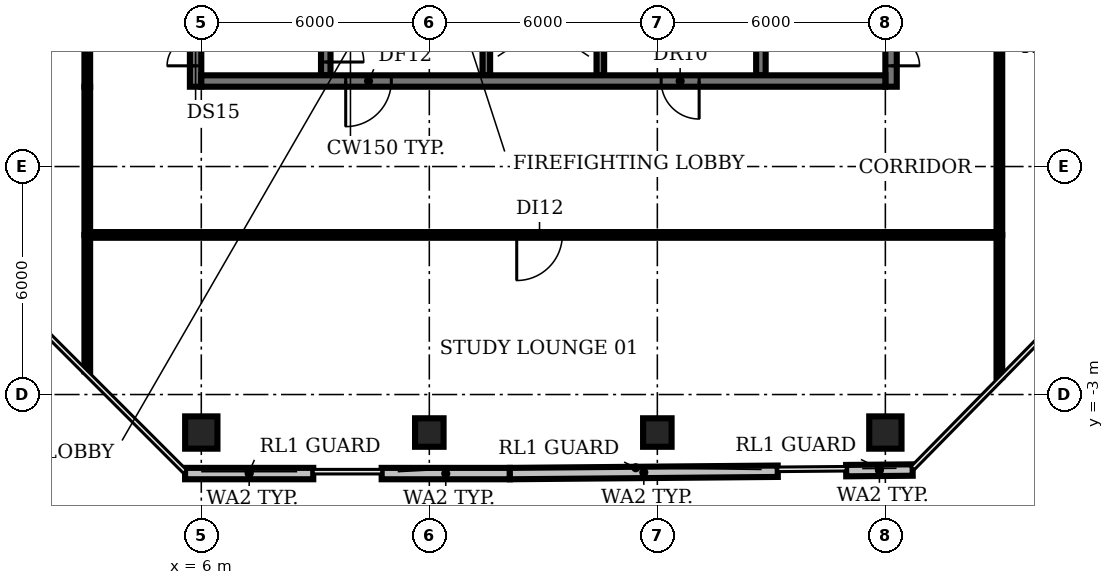
"""IFC4 building model, lengths in metres.
Left out: names, types, materials, properties, quantities, classifications, styles, units other than length and angle.
Written with IfcOpenShell. Run it as: python <this file> out.ifc"""

import sys

from ifc_helpers import new_model, si_unit, direction, frame, frame_2d, origin, origin_2d, place, context, subcontext, project, spatial, rectangle, circle, extrude, element, fill, save


model = new_model("IFC4")
c1 = context("Model", 3, precision=1e-05, world=origin(), true_north=direction((0.0, 1.0)))
c2 = subcontext(c1, "Body", "Model", "MODEL_VIEW")
j1 = project(units=[si_unit("LENGTHUNIT", "METRE"), si_unit("PLANEANGLEUNIT", "RADIAN")], contexts=[c1])
p1 = place(None, origin())
s1 = spatial("IfcSite", under=j1, at=p1, CompositionType="ELEMENT")
p2 = place(p1, origin())
s2 = spatial("IfcBuilding", under=s1, at=p2, CompositionType="ELEMENT")
p3 = place(p2, frame((0.0, 0.0, 289.4)))
s3 = spatial("IfcBuildingStorey", under=s2, at=p3, CompositionType="ELEMENT", Elevation=289.4)
p4 = place(p3, frame((6.0, -4.0, 0.0), z_axis=(0.0, 0.0, 1.0), x_axis=(1.0, 0.0, 0.0)))
e1 = element("IfcColumn", 1, at=p4, inside=s3, PredefinedType="COLUMN", context=c2, shape_type="SweptSolid", body=[
    extrude(circle(Radius=0.425, at=origin_2d()), origin(), (0.0, 0.0, 1.0), 3.85),
])
for number, where, z_axis, x_axis in (
    (2, (12.0, -4.0, 0.0), (0.0, 0.0, 1.0), (1.0, 0.0, 0.0)),
    (3, (18.0, -4.0, 0.0), (0.0, 0.0, 1.0), (1.0, 0.0, 0.0)),
):
    element("IfcColumn", number, at=place(p3, frame(where, z_axis=z_axis, x_axis=x_axis)), inside=s3, PredefinedType="COLUMN", context=c2, shape_type="SweptSolid", body=[
        extrude(rectangle(XDim=0.75, YDim=0.75, at=origin_2d()), origin(), (0.0, 0.0, 1.0), 3.85),
    ])
p5 = place(p3, frame((24.0, -4.0, 0.0), z_axis=(0.0, 0.0, 1.0), x_axis=(1.0, 0.0, 0.0)))
e4 = element("IfcColumn", 4, at=p5, inside=s3, PredefinedType="COLUMN", context=c2, shape_type="SweptSolid", body=[
    extrude(circle(Radius=0.425, at=origin_2d()), origin(), (0.0, 0.0, 1.0), 3.85),
])
p6 = place(p3, frame((5.573, -5.08, 0.0), z_axis=(0.0, 0.0, 1.0), x_axis=(1.0, 0.0, 0.0)))
e5 = element("IfcWall", 5, at=p6, inside=s3, PredefinedType="SOLIDWALL", context=c2, shape_type="SweptSolid", body=[
    extrude(rectangle(XDim=3.373, YDim=0.3, at=frame_2d((1.686, 0.0))), origin(), (0.0, 0.0, 1.0), 3.85),
])
p7 = place(p3, frame((10.746, -5.08, 0.0), z_axis=(0.0, 0.0, 1.0), x_axis=(1.0, 0.0, 0.0)))
e6 = element("IfcWall", 6, at=p7, inside=s3, PredefinedType="SOLIDWALL", context=c2, shape_type="SweptSolid", body=[
    extrude(rectangle(XDim=3.373, YDim=0.3, at=frame_2d((1.687, 0.0))), origin(), (0.0, 0.0, 1.0), 3.85),
])
p8 = place(p3, frame((14.119, -5.08, 0.0), z_axis=(0.0, 0.0, 1.0), x_axis=(0.999961916893, 0.008727242608, 0.0)))
e7 = element("IfcWall", 7, at=p8, inside=s3, PredefinedType="SOLIDWALL", context=c2, shape_type="SweptSolid", body=[
    extrude(rectangle(XDim=7.05, YDim=0.3, at=frame_2d((3.525, 0.0))), origin(), (0.0, 0.0, 1.0), 3.85),
])
p9 = place(p3, frame((22.969, -5.002, 0.0), z_axis=(0.0, 0.0, 1.0), x_axis=(0.999962584272, 0.008650436755, 0.0)))
e8 = element("IfcWall", 8, at=p9, inside=s3, PredefinedType="SOLIDWALL", context=c2, shape_type="SweptSolid", body=[
    extrude(rectangle(XDim=1.75, YDim=0.3, at=frame_2d((0.875, 0.0))), origin(), (0.0, 0.0, 1.0), 3.85),
])
p10 = place(p3, frame((9.275, 11.825, 0.0), z_axis=(0.0, 0.0, 1.0), x_axis=(0.0, -1.0, 0.0)))
e9 = element("IfcWall", 9, at=p10, inside=s3, PredefinedType="SHEAR", context=c2, shape_type="SweptSolid", body=[
    extrude(rectangle(XDim=6.425, YDim=0.25, at=frame_2d((3.212, 0.0))), origin(), (0.0, 0.0, 1.0), 3.85),
])
p11 = place(p10, frame((5.075, 0.0, 0.0)))
e10 = element("IfcOpeningElement", 10, at=p11, cuts=e9, PredefinedType="OPENING", context=c2, shape_type="SweptSolid", body=[
    extrude(rectangle(XDim=1.0, YDim=2.1, at=frame_2d((0.5, 1.05))), frame((0.0, 0.135, 0.0), z_axis=(0.0, -1.0, 0.0), x_axis=(1.0, 0.0, 0.0)), (0.0, 0.0, 1.0), 0.27),
])
p12 = place(p3, frame((13.5, 5.4, 0.0), z_axis=(0.0, 0.0, 1.0), x_axis=(0.0, 1.0, 0.0)))
e11 = element("IfcWall", 11, at=p12, inside=s3, PredefinedType="SHEAR", context=c2, shape_type="SweptSolid", body=[
    extrude(rectangle(XDim=8.2, YDim=0.2, at=frame_2d((4.1, 0.0))), origin(), (0.0, 0.0, 1.0), 3.85),
])
p13 = place(p12, frame((0.75, 0.0, 0.0)))
e12 = element("IfcOpeningElement", 12, at=p13, cuts=e11, PredefinedType="OPENING", context=c2, shape_type="SweptSolid", body=[
    extrude(rectangle(XDim=1.1, YDim=2.1, at=frame_2d((0.55, 1.05))), frame((0.0, 0.11, 0.0), z_axis=(0.0, -1.0, 0.0), x_axis=(1.0, 0.0, 0.0)), (0.0, 0.0, 1.0), 0.22),
])
p14 = place(p12, frame((3.55, 0.0, 0.0)))
e13 = element("IfcOpeningElement", 13, at=p14, cuts=e11, PredefinedType="OPENING", context=c2, shape_type="SweptSolid", body=[
    extrude(rectangle(XDim=1.1, YDim=2.1, at=frame_2d((0.55, 1.05))), frame((0.0, 0.11, 0.0), z_axis=(0.0, -1.0, 0.0), x_axis=(1.0, 0.0, 0.0)), (0.0, 0.0, 1.0), 0.22),
])
p15 = place(p12, frame((6.35, 0.0, 0.0)))
e14 = element("IfcOpeningElement", 14, at=p15, cuts=e11, PredefinedType="OPENING", context=c2, shape_type="SweptSolid", body=[
    extrude(rectangle(XDim=1.1, YDim=2.1, at=frame_2d((0.55, 1.05))), frame((0.0, 0.11, 0.0), z_axis=(0.0, -1.0, 0.0), x_axis=(1.0, 0.0, 0.0)), (0.0, 0.0, 1.0), 0.22),
])
p16 = place(p3, frame((16.5, 5.4, 0.0), z_axis=(0.0, 0.0, 1.0), x_axis=(0.0, 1.0, 0.0)))
e15 = element("IfcWall", 15, at=p16, inside=s3, PredefinedType="SHEAR", context=c2, shape_type="SweptSolid", body=[
    extrude(rectangle(XDim=8.2, YDim=0.2, at=frame_2d((4.1, 0.0))), origin(), (0.0, 0.0, 1.0), 3.85),
])
p17 = place(p3, frame((20.725, 5.4, 0.0), z_axis=(0.0, 0.0, 1.0), x_axis=(0.0, 1.0, 0.0)))
e16 = element("IfcWall", 16, at=p17, inside=s3, PredefinedType="SHEAR", context=c2, shape_type="SweptSolid", body=[
    extrude(rectangle(XDim=6.3, YDim=0.25, at=frame_2d((3.15, 0.0))), origin(), (0.0, 0.0, 1.0), 3.85),
])
p18 = place(p3, frame((5.85, 5.1, 0.0), z_axis=(0.0, 0.0, 1.0), x_axis=(0.0, 1.0, 0.0)))
e17 = element("IfcWall", 17, at=p18, inside=s3, PredefinedType="SHEAR", context=c2, shape_type="SweptSolid", body=[
    extrude(rectangle(XDim=20.0, YDim=0.3, at=frame_2d((10.0, 0.0))), origin(), (0.0, 0.0, 1.0), 3.85),
])
p19 = place(p18, frame((0.55, 0.0, 0.0)))
e18 = element("IfcOpeningElement", 18, at=p19, cuts=e17, PredefinedType="OPENING", context=c2, shape_type="SweptSolid", body=[
    extrude(rectangle(XDim=1.5, YDim=2.1, at=frame_2d((0.75, 1.05))), frame((0.0, 0.16, 0.0), z_axis=(0.0, -1.0, 0.0), x_axis=(1.0, 0.0, 0.0)), (0.0, 0.0, 1.0), 0.32),
])
p20 = place(p18, frame((7.0, 0.0, 0.0)))
e19 = element("IfcOpeningElement", 19, at=p20, cuts=e17, PredefinedType="OPENING", context=c2, shape_type="SweptSolid", body=[
    extrude(rectangle(XDim=1.2, YDim=2.1, at=frame_2d((0.6, 1.05))), frame((0.0, 0.16, 0.0), z_axis=(0.0, -1.0, 0.0), x_axis=(1.0, 0.0, 0.0)), (0.0, 0.0, 1.0), 0.32),
])
p21 = place(p18, frame((13.55, 0.0, 0.0)))
e20 = element("IfcOpeningElement", 20, at=p21, cuts=e17, PredefinedType="OPENING", context=c2, shape_type="SweptSolid", body=[
    extrude(rectangle(XDim=1.2, YDim=2.1, at=frame_2d((0.6, 1.05))), frame((0.0, 0.16, 0.0), z_axis=(0.0, -1.0, 0.0), x_axis=(1.0, 0.0, 0.0)), (0.0, 0.0, 1.0), 0.32),
])
p22 = place(p3, frame((24.15, 25.655, 0.0), z_axis=(0.0, 0.0, 1.0), x_axis=(0.0, -1.0, 0.0)))
e21 = element("IfcWall", 21, at=p22, inside=s3, PredefinedType="SHEAR", context=c2, shape_type="SweptSolid", body=[
    extrude(rectangle(XDim=20.555, YDim=0.3, at=frame_2d((10.277, 0.0))), origin(), (0.0, 0.0, 1.0), 3.85),
])
p23 = place(p22, frame((18.505, 0.0, 0.0)))
e22 = element("IfcOpeningElement", 22, at=p23, cuts=e21, PredefinedType="OPENING", context=c2, shape_type="SweptSolid", body=[
    extrude(rectangle(XDim=1.5, YDim=2.1, at=frame_2d((0.75, 1.05))), frame((0.0, 0.16, 0.0), z_axis=(0.0, -1.0, 0.0), x_axis=(1.0, 0.0, 0.0)), (0.0, 0.0, 1.0), 0.32),
])
p24 = place(p22, frame((12.405, 0.0, 0.0)))
e23 = element("IfcOpeningElement", 23, at=p24, cuts=e21, PredefinedType="OPENING", context=c2, shape_type="SweptSolid", body=[
    extrude(rectangle(XDim=0.9, YDim=2.1, at=frame_2d((0.45, 1.05))), frame((0.0, 0.16, 0.0), z_axis=(0.0, -1.0, 0.0), x_axis=(1.0, 0.0, 0.0)), (0.0, 0.0, 1.0), 0.32),
])
p25 = place(p22, frame((6.405, 0.0, 0.0)))
e24 = element("IfcOpeningElement", 24, at=p25, cuts=e21, PredefinedType="OPENING", context=c2, shape_type="SweptSolid", body=[
    extrude(rectangle(XDim=2.0, YDim=2.1, at=frame_2d((1.0, 1.05))), frame((0.0, 0.16, 0.0), z_axis=(0.0, -1.0, 0.0), x_axis=(1.0, 0.0, 0.0)), (0.0, 0.0, 1.0), 0.32),
])
p26 = place(p3, frame((24.0, 5.25, 0.0), z_axis=(0.0, 0.0, 1.0), x_axis=(-1.0, 0.0, 0.0)))
e25 = element("IfcWall", 25, at=p26, inside=s3, PredefinedType="SHEAR", context=c2, shape_type="SweptSolid", body=[
    extrude(rectangle(XDim=18.0, YDim=0.3, at=frame_2d((9.0, 0.0))), origin(), (0.0, 0.0, 1.0), 3.85),
])
p27 = place(p26, frame((13.0, 0.0, 0.0)))
e26 = element("IfcOpeningElement", 26, at=p27, cuts=e25, PredefinedType="OPENING", context=c2, shape_type="SweptSolid", body=[
    extrude(rectangle(XDim=1.2, YDim=2.1, at=frame_2d((0.6, 1.05))), frame((0.0, 0.16, 0.0), z_axis=(0.0, -1.0, 0.0), x_axis=(1.0, 0.0, 0.0)), (0.0, 0.0, 1.0), 0.32),
])
p28 = place(p26, frame((4.9, 0.0, 0.0)))
e27 = element("IfcOpeningElement", 27, at=p28, cuts=e25, PredefinedType="OPENING", context=c2, shape_type="SweptSolid", body=[
    extrude(rectangle(XDim=1.0, YDim=2.1, at=frame_2d((0.5, 1.05))), frame((0.0, 0.16, 0.0), z_axis=(0.0, -1.0, 0.0), x_axis=(1.0, 0.0, 0.0)), (0.0, 0.0, 1.0), 0.32),
])
p29 = place(p3, frame((3.0, -2.39, 0.0), z_axis=(0.0, 0.0, 1.0), x_axis=(0.0, 1.0, 0.0)))
e28 = element("IfcWall", 28, at=p29, inside=s3, PredefinedType="PARTITIONING", context=c2, shape_type="SweptSolid", body=[
    extrude(rectangle(XDim=3.59, YDim=0.15, at=frame_2d((1.795, 0.0))), origin(), (0.0, 0.0, 1.0), 2.9),
])
p30 = place(p3, frame((3.0, 1.2, 0.0), z_axis=(0.0, 0.0, 1.0), x_axis=(0.0, 1.0, 0.0)))
e29 = element("IfcWall", 29, at=p30, inside=s3, PredefinedType="PARTITIONING", context=c2, shape_type="SweptSolid", body=[
    extrude(rectangle(XDim=3.9, YDim=0.15, at=frame_2d((1.95, 0.0))), origin(), (0.0, 0.0, 1.0), 2.9),
])
p31 = place(p3, frame((3.0, 5.1, 0.0), z_axis=(0.0, 0.0, 1.0), x_axis=(0.0, 1.0, 0.0)))
e30 = element("IfcWall", 30, at=p31, inside=s3, PredefinedType="PARTITIONING", context=c2, shape_type="SweptSolid", body=[
    extrude(rectangle(XDim=20.0, YDim=0.15, at=frame_2d((10.0, 0.0))), origin(), (0.0, 0.0, 1.0), 2.9),
])
p32 = place(p31, frame((9.3, 0.0, 0.0)))
e31 = element("IfcOpeningElement", 31, at=p32, cuts=e30, PredefinedType="OPENING", context=c2, shape_type="SweptSolid", body=[
    extrude(rectangle(XDim=1.2, YDim=2.1, at=frame_2d((0.6, 1.05))), frame((0.0, 0.085, 0.0), z_axis=(0.0, -1.0, 0.0), x_axis=(1.0, 0.0, 0.0)), (0.0, 0.0, 1.0), 0.17),
])
p33 = place(p3, frame((27.0, -2.54, 0.0), z_axis=(0.0, 0.0, 1.0), x_axis=(0.0, 1.0, 0.0)))
e32 = element("IfcWall", 32, at=p33, inside=s3, PredefinedType="PARTITIONING", context=c2, shape_type="SweptSolid", body=[
    extrude(rectangle(XDim=3.74, YDim=0.15, at=frame_2d((1.87, 0.0))), origin(), (0.0, 0.0, 1.0), 2.9),
])
p34 = place(p3, frame((27.0, 1.2, 0.0), z_axis=(0.0, 0.0, 1.0), x_axis=(-1.0, 0.0, 0.0)))
e33 = element("IfcWall", 33, at=p34, inside=s3, PredefinedType="PARTITIONING", context=c2, shape_type="SweptSolid", body=[
    extrude(rectangle(XDim=24.0, YDim=0.15, at=frame_2d((12.0, 0.0))), origin(), (0.0, 0.0, 1.0), 2.9),
])
p35 = place(p34, frame((11.5, 0.0, 0.0)))
e34 = element("IfcOpeningElement", 34, at=p35, cuts=e33, PredefinedType="OPENING", context=c2, shape_type="SweptSolid", body=[
    extrude(rectangle(XDim=1.2, YDim=2.1, at=frame_2d((0.6, 1.05))), frame((0.0, 0.085, 0.0), z_axis=(0.0, -1.0, 0.0), x_axis=(1.0, 0.0, 0.0)), (0.0, 0.0, 1.0), 0.17),
])
p36 = place(p3, frame((27.0, 1.2, 0.0), z_axis=(0.0, 0.0, 1.0), x_axis=(0.0, 1.0, 0.0)))
e35 = element("IfcWall", 35, at=p36, inside=s3, PredefinedType="PARTITIONING", context=c2, shape_type="SweptSolid", body=[
    extrude(rectangle(XDim=7.65, YDim=0.15, at=frame_2d((3.825, 0.0))), origin(), (0.0, 0.0, 1.0), 2.9),
])
p37 = place(p11, origin())
e36 = element("IfcDoor", 36, at=p37, inside=s3, OperationType="SINGLE_SWING_RIGHT", PredefinedType="DOOR", context=c2, shape_type="SweptSolid", body=[
    extrude(rectangle(XDim=1.0, YDim=2.1, at=frame_2d((0.5, 1.05))), frame((0.0, 0.025, 0.0), z_axis=(0.0, -1.0, 0.0), x_axis=(1.0, 0.0, 0.0)), (0.0, 0.0, 1.0), 0.05),
])
fill(e10, e36)
p38 = place(p19, origin())
e37 = element("IfcDoor", 37, at=p38, inside=s3, OperationType="DOUBLE_DOOR_SINGLE_SWING", PredefinedType="DOOR", context=c2, shape_type="SweptSolid", body=[
    extrude(rectangle(XDim=1.5, YDim=2.1, at=frame_2d((0.75, 1.05))), frame((0.0, 0.025, 0.0), z_axis=(0.0, -1.0, 0.0), x_axis=(1.0, 0.0, 0.0)), (0.0, 0.0, 1.0), 0.05),
])
fill(e18, e37)
p39 = place(p23, origin())
e38 = element("IfcDoor", 38, at=p39, inside=s3, OperationType="DOUBLE_DOOR_SINGLE_SWING", PredefinedType="DOOR", context=c2, shape_type="SweptSolid", body=[
    extrude(rectangle(XDim=1.5, YDim=2.1, at=frame_2d((0.75, 1.05))), frame((0.0, 0.025, 0.0), z_axis=(0.0, -1.0, 0.0), x_axis=(1.0, 0.0, 0.0)), (0.0, 0.0, 1.0), 0.05),
])
fill(e22, e38)
p40 = place(p27, origin())
e39 = element("IfcDoor", 39, at=p40, inside=s3, OperationType="SINGLE_SWING_RIGHT", PredefinedType="DOOR", context=c2, shape_type="SweptSolid", body=[
    extrude(rectangle(XDim=1.2, YDim=2.1, at=frame_2d((0.6, 1.05))), frame((0.0, 0.025, 0.0), z_axis=(0.0, -1.0, 0.0), x_axis=(1.0, 0.0, 0.0)), (0.0, 0.0, 1.0), 0.05),
])
fill(e26, e39)
p41 = place(p28, origin())
e40 = element("IfcDoor", 40, at=p41, inside=s3, OperationType="SINGLE_SWING_LEFT", PredefinedType="DOOR", context=c2, shape_type="SweptSolid", body=[
    extrude(rectangle(XDim=1.0, YDim=2.1, at=frame_2d((0.5, 1.05))), frame((0.0, 0.025, 0.0), z_axis=(0.0, -1.0, 0.0), x_axis=(1.0, 0.0, 0.0)), (0.0, 0.0, 1.0), 0.05),
])
fill(e27, e40)
p42 = place(p35, origin())
e41 = element("IfcDoor", 41, at=p42, inside=s3, OperationType="SINGLE_SWING_RIGHT", PredefinedType="DOOR", context=c2, shape_type="SweptSolid", body=[
    extrude(rectangle(XDim=1.2, YDim=2.1, at=frame_2d((0.6, 1.05))), frame((0.0, 0.025, 0.0), z_axis=(0.0, -1.0, 0.0), x_axis=(1.0, 0.0, 0.0)), (0.0, 0.0, 1.0), 0.05),
])
fill(e34, e41)
save(model, sys.argv[1])
